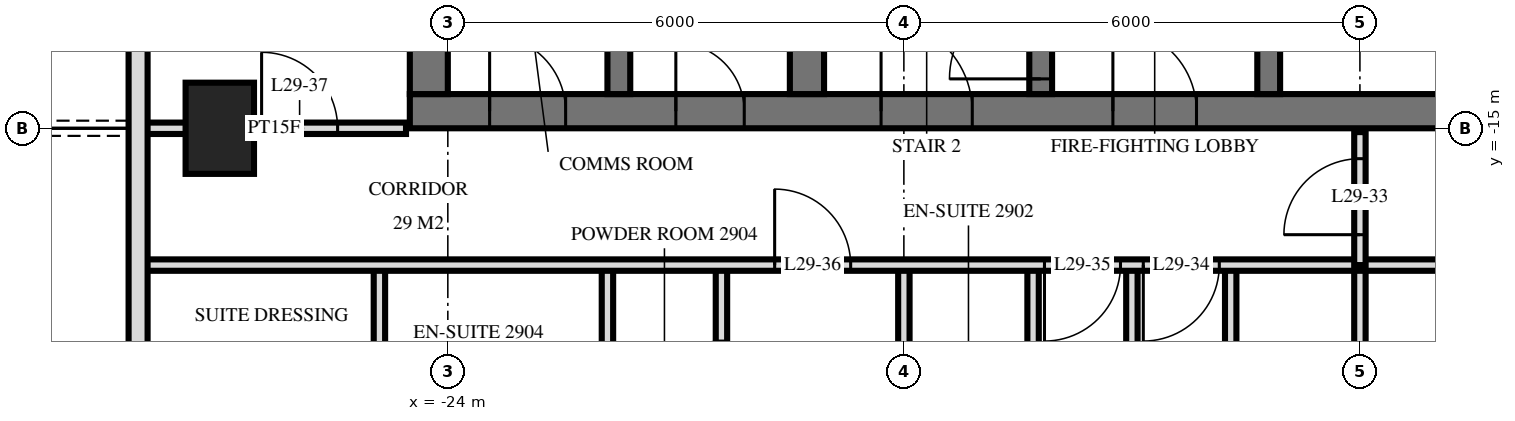
"""IFC4 building model, lengths in metres.
Left out: names, types, materials, properties, quantities, classifications, styles, units other than length and angle.
Written with IfcOpenShell. Run it as: python <this file> out.ifc"""

import sys

from ifc_helpers import new_model, si_unit, direction, frame, frame_2d, origin, origin_2d, place, context, subcontext, project, spatial, rectangle, extrude, element, fill, save


model = new_model("IFC4")
c1 = context("Model", 3, precision=1e-05, world=origin(), true_north=direction((0.0, 1.0)))
c2 = subcontext(c1, "Body", "Model", "MODEL_VIEW")
j1 = project(units=[si_unit("LENGTHUNIT", "METRE"), si_unit("PLANEANGLEUNIT", "RADIAN")], contexts=[c1])
p1 = place(None, origin())
s1 = spatial("IfcSite", under=j1, at=p1, CompositionType="ELEMENT")
p2 = place(p1, origin())
s2 = spatial("IfcBuilding", under=s1, at=p2, CompositionType="ELEMENT")
p3 = place(p2, frame((0.0, 0.0, 116.4)))
s3 = spatial("IfcBuildingStorey", under=s2, at=p3, CompositionType="ELEMENT", Elevation=116.4)
p4 = place(p3, frame((-27.0, -15.0, 0.0), z_axis=(0.0, 0.0, 1.0), x_axis=(0.0, 1.0, 0.0)))
e1 = element("IfcColumn", 1, at=p4, inside=s3, PredefinedType="COLUMN", context=c2, shape_type="SweptSolid", body=[
    extrude(rectangle(XDim=1.2, YDim=0.9, at=origin_2d()), origin(), (0.0, 0.0, 1.0), 3.6),
])
p5 = place(p3, frame((-24.5, -14.775, 0.0), z_axis=(0.0, 0.0, 1.0), x_axis=(1.0, 0.0, 0.0)))
e2 = element("IfcWall", 2, at=p5, inside=s3, PredefinedType="SHEAR", context=c2, shape_type="SweptSolid", body=[
    extrude(rectangle(XDim=14.5, YDim=0.45, at=frame_2d((7.25, 0.0))), origin(), (0.0, 0.0, 1.0), 3.6),
])
p6 = place(p5, frame((6.2, 0.0, 0.0)))
e3 = element("IfcOpeningElement", 3, at=p6, cuts=e2, PredefinedType="OPENING", context=c2, shape_type="SweptSolid", body=[
    extrude(rectangle(XDim=1.2, YDim=2.1, at=frame_2d((0.6, 1.05))), frame((0.0, 0.235, 0.0), z_axis=(0.0, -1.0, 0.0), x_axis=(1.0, 0.0, 0.0)), (0.0, 0.0, 1.0), 0.47),
])
p7 = place(p5, frame((9.25, 0.0, 0.0)))
e4 = element("IfcOpeningElement", 4, at=p7, cuts=e2, PredefinedType="OPENING", context=c2, shape_type="SweptSolid", body=[
    extrude(rectangle(XDim=1.1, YDim=2.1, at=frame_2d((0.55, 1.05))), frame((0.0, 0.235, 0.0), z_axis=(0.0, -1.0, 0.0), x_axis=(1.0, 0.0, 0.0)), (0.0, 0.0, 1.0), 0.47),
])
p8 = place(p5, frame((3.5, 0.0, 0.0)))
e5 = element("IfcOpeningElement", 5, at=p8, cuts=e2, PredefinedType="OPENING", context=c2, shape_type="SweptSolid", body=[
    extrude(rectangle(XDim=0.9, YDim=2.1, at=frame_2d((0.45, 1.05))), frame((0.0, 0.235, 0.0), z_axis=(0.0, -1.0, 0.0), x_axis=(1.0, 0.0, 0.0)), (0.0, 0.0, 1.0), 0.47),
])
p9 = place(p5, frame((1.05, 0.0, 0.0)))
e6 = element("IfcOpeningElement", 6, at=p9, cuts=e2, PredefinedType="OPENING", context=c2, shape_type="SweptSolid", body=[
    extrude(rectangle(XDim=1.0, YDim=2.1, at=frame_2d((0.5, 1.05))), frame((0.0, 0.235, 0.0), z_axis=(0.0, -1.0, 0.0), x_axis=(1.0, 0.0, 0.0)), (0.0, 0.0, 1.0), 0.47),
])
p10 = place(p3, frame((-24.25, -14.55, 0.0), z_axis=(0.0, 0.0, 1.0), x_axis=(0.0, 1.0, 0.0)))
e7 = element("IfcWall", 7, at=p10, inside=s3, PredefinedType="SHEAR", context=c2, shape_type="SweptSolid", body=[
    extrude(rectangle(XDim=14.1, YDim=0.5, at=frame_2d((7.05, 0.0))), origin(), (0.0, 0.0, 1.0), 3.6),
])
p11 = place(p3, frame((-13.2, -14.55, 0.0), z_axis=(0.0, 0.0, 1.0), x_axis=(0.0, 1.0, 0.0)))
e8 = element("IfcWall", 8, at=p11, inside=s3, PredefinedType="SHEAR", context=c2, shape_type="SweptSolid", body=[
    extrude(rectangle(XDim=5.4, YDim=0.3, at=frame_2d((2.7, 0.0))), origin(), (0.0, 0.0, 1.0), 3.6),
])
p12 = place(p11, frame((4.0, 0.0, 0.0)))
e9 = element("IfcOpeningElement", 9, at=p12, cuts=e8, PredefinedType="OPENING", context=c2, shape_type="SweptSolid", body=[
    extrude(rectangle(XDim=1.2, YDim=2.1, at=frame_2d((0.6, 1.05))), frame((0.0, 0.16, 0.0), z_axis=(0.0, -1.0, 0.0), x_axis=(1.0, 0.0, 0.0)), (0.0, 0.0, 1.0), 0.32),
])
p13 = place(p3, frame((-16.2, -14.55, 0.0), z_axis=(0.0, 0.0, 1.0), x_axis=(0.0, 1.0, 0.0)))
e10 = element("IfcWall", 10, at=p13, inside=s3, PredefinedType="SHEAR", context=c2, shape_type="SweptSolid", body=[
    extrude(rectangle(XDim=5.4, YDim=0.3, at=frame_2d((2.7, 0.0))), origin(), (0.0, 0.0, 1.0), 3.6),
])
p14 = place(p13, frame((0.2, 0.0, 0.0)))
e11 = element("IfcOpeningElement", 11, at=p14, cuts=e10, PredefinedType="OPENING", context=c2, shape_type="SweptSolid", body=[
    extrude(rectangle(XDim=1.2, YDim=2.1, at=frame_2d((0.6, 1.05))), frame((0.0, 0.16, 0.0), z_axis=(0.0, -1.0, 0.0), x_axis=(1.0, 0.0, 0.0)), (0.0, 0.0, 1.0), 0.32),
])
p15 = place(p3, frame((-19.275, -14.55, 0.0), z_axis=(0.0, 0.0, 1.0), x_axis=(0.0, 1.0, 0.0)))
e12 = element("IfcWall", 12, at=p15, inside=s3, PredefinedType="SHEAR", context=c2, shape_type="SweptSolid", body=[
    extrude(rectangle(XDim=5.4, YDim=0.45, at=frame_2d((2.7, 0.0))), origin(), (0.0, 0.0, 1.0), 3.6),
])
p16 = place(p3, frame((-21.75, -14.55, 0.0), z_axis=(0.0, 0.0, 1.0), x_axis=(0.0, 1.0, 0.0)))
e13 = element("IfcWall", 13, at=p16, inside=s3, PredefinedType="SHEAR", context=c2, shape_type="SweptSolid", body=[
    extrude(rectangle(XDim=5.4, YDim=0.3, at=frame_2d((2.7, 0.0))), origin(), (0.0, 0.0, 1.0), 3.6),
])
p17 = place(p3, frame((-28.075, -3.325, 0.0), z_axis=(0.0, 0.0, 1.0), x_axis=(0.0, -1.0, 0.0)))
e14 = element("IfcWall", 14, at=p17, inside=s3, PredefinedType="SOLIDWALL", context=c2, shape_type="SweptSolid", body=[
    extrude(rectangle(XDim=25.951, YDim=0.25, at=frame_2d((12.975, 0.0))), origin(), (0.0, 0.0, 1.0), 3.32),
])
p18 = place(p17, frame((7.025, 0.0, 0.0)))
e15 = element("IfcOpeningElement", 15, at=p18, cuts=e14, PredefinedType="OPENING", context=c2, shape_type="SweptSolid", body=[
    extrude(rectangle(XDim=1.8, YDim=2.4, at=frame_2d((0.9, 1.2))), frame((0.0, 0.135, 0.0), z_axis=(0.0, -1.0, 0.0), x_axis=(1.0, 0.0, 0.0)), (0.0, 0.0, 1.0), 0.27),
])
p19 = place(p17, frame((18.175, 0.0, 0.0)))
e16 = element("IfcOpeningElement", 16, at=p19, cuts=e14, PredefinedType="OPENING", context=c2, shape_type="SweptSolid", body=[
    extrude(rectangle(XDim=1.8, YDim=2.4, at=frame_2d((0.9, 1.2))), frame((0.0, 0.135, 0.0), z_axis=(0.0, -1.0, 0.0), x_axis=(1.0, 0.0, 0.0)), (0.0, 0.0, 1.0), 0.27),
])
p20 = place(p17, frame((21.075, 0.0, 0.0)))
e17 = element("IfcOpeningElement", 17, at=p20, cuts=e14, PredefinedType="OPENING", context=c2, shape_type="SweptSolid", body=[
    extrude(rectangle(XDim=1.8, YDim=2.4, at=frame_2d((0.9, 1.2))), frame((0.0, 0.135, 0.0), z_axis=(0.0, -1.0, 0.0), x_axis=(1.0, 0.0, 0.0)), (0.0, 0.0, 1.0), 0.27),
])
p21 = place(p17, frame((23.825, 0.0, 0.3)))
e18 = element("IfcOpeningElement", 18, at=p21, cuts=e14, PredefinedType="OPENING", context=c2, shape_type="SweptSolid", body=[
    extrude(rectangle(XDim=1.8, YDim=2.1, at=frame_2d((0.9, 1.05))), frame((0.0, 0.135, 0.0), z_axis=(0.0, -1.0, 0.0), x_axis=(1.0, 0.0, 0.0)), (0.0, 0.0, 1.0), 0.27),
])
p22 = place(p3, frame((-12.0, -16.8, 0.0), z_axis=(0.0, 0.0, 1.0), x_axis=(0.0, 1.0, 0.0)))
e19 = element("IfcWall", 19, at=p22, inside=s3, PredefinedType="PARTITIONING", context=c2, shape_type="SweptSolid", body=[
    extrude(rectangle(XDim=1.75, YDim=0.15, at=frame_2d((0.875, 0.0))), origin(), (0.0, 0.0, 1.0), 3.32),
])
p23 = place(p22, frame((0.4, 0.0, 0.0)))
e20 = element("IfcOpeningElement", 20, at=p23, cuts=e19, PredefinedType="OPENING", context=c2, shape_type="SweptSolid", body=[
    extrude(rectangle(XDim=1.0, YDim=2.1, at=frame_2d((0.5, 1.05))), frame((0.0, 0.085, 0.0), z_axis=(0.0, -1.0, 0.0), x_axis=(1.0, 0.0, 0.0)), (0.0, 0.0, 1.0), 0.17),
])
p24 = place(p3, frame((-12.0, -33.62, 0.0), z_axis=(0.0, 0.0, 1.0), x_axis=(0.0, 1.0, 0.0)))
e21 = element("IfcWall", 21, at=p24, inside=s3, PredefinedType="PARTITIONING", context=c2, shape_type="SweptSolid", body=[
    extrude(rectangle(XDim=16.82, YDim=0.15, at=frame_2d((8.41, 0.0))), origin(), (0.0, 0.0, 1.0), 3.32),
])
p25 = place(p3, frame((-13.7, -20.6, 0.0), z_axis=(0.0, 0.0, 1.0), x_axis=(0.0, 1.0, 0.0)))
e22 = element("IfcWall", 22, at=p25, inside=s3, PredefinedType="PARTITIONING", context=c2, shape_type="SweptSolid", body=[
    extrude(rectangle(XDim=3.8, YDim=0.15, at=frame_2d((1.9, 0.0))), origin(), (0.0, 0.0, 1.0), 3.32),
])
p26 = place(p25, frame((1.5, 0.0, 0.0)))
e23 = element("IfcOpeningElement", 23, at=p26, cuts=e22, PredefinedType="OPENING", context=c2, shape_type="SweptSolid", body=[
    extrude(rectangle(XDim=0.8, YDim=2.1, at=frame_2d((0.4, 1.05))), frame((0.0, 0.085, 0.0), z_axis=(0.0, -1.0, 0.0), x_axis=(1.0, 0.0, 0.0)), (0.0, 0.0, 1.0), 0.17),
])
p27 = place(p3, frame((-15.0, -33.62, 0.0), z_axis=(0.0, 0.0, 1.0), x_axis=(0.0, 1.0, 0.0)))
e24 = element("IfcWall", 24, at=p27, inside=s3, PredefinedType="PARTITIONING", context=c2, shape_type="SweptSolid", body=[
    extrude(rectangle(XDim=16.82, YDim=0.15, at=frame_2d((8.41, 0.0))), origin(), (0.0, 0.0, 1.0), 3.32),
])
p28 = place(p3, frame((-16.3, -20.6, 0.0), z_axis=(0.0, 0.0, 1.0), x_axis=(0.0, 1.0, 0.0)))
e25 = element("IfcWall", 25, at=p28, inside=s3, PredefinedType="PARTITIONING", context=c2, shape_type="SweptSolid", body=[
    extrude(rectangle(XDim=3.8, YDim=0.15, at=frame_2d((1.9, 0.0))), origin(), (0.0, 0.0, 1.0), 3.32),
])
p29 = place(p28, frame((1.5, 0.0, 0.0)))
e26 = element("IfcOpeningElement", 26, at=p29, cuts=e25, PredefinedType="OPENING", context=c2, shape_type="SweptSolid", body=[
    extrude(rectangle(XDim=0.8, YDim=2.1, at=frame_2d((0.4, 1.05))), frame((0.0, 0.085, 0.0), z_axis=(0.0, -1.0, 0.0), x_axis=(1.0, 0.0, 0.0)), (0.0, 0.0, 1.0), 0.17),
])
p30 = place(p3, frame((-18.0, -19.8, 0.0), z_axis=(0.0, 0.0, 1.0), x_axis=(0.0, 1.0, 0.0)))
e27 = element("IfcWall", 27, at=p30, inside=s3, PredefinedType="PARTITIONING", context=c2, shape_type="SweptSolid", body=[
    extrude(rectangle(XDim=3.0, YDim=0.15, at=frame_2d((1.5, 0.0))), origin(), (0.0, 0.0, 1.0), 3.32),
])
p31 = place(p3, frame((-20.4, -19.8, 0.0), z_axis=(0.0, 0.0, 1.0), x_axis=(0.0, 1.0, 0.0)))
e28 = element("IfcWall", 28, at=p31, inside=s3, PredefinedType="PARTITIONING", context=c2, shape_type="SweptSolid", body=[
    extrude(rectangle(XDim=3.0, YDim=0.15, at=frame_2d((1.5, 0.0))), origin(), (0.0, 0.0, 1.0), 3.32),
])
p32 = place(p31, frame((1.0, 0.0, 0.0)))
e29 = element("IfcOpeningElement", 29, at=p32, cuts=e28, PredefinedType="OPENING", context=c2, shape_type="SweptSolid", body=[
    extrude(rectangle(XDim=1.0, YDim=2.1, at=frame_2d((0.5, 1.05))), frame((0.0, 0.085, 0.0), z_axis=(0.0, -1.0, 0.0), x_axis=(1.0, 0.0, 0.0)), (0.0, 0.0, 1.0), 0.17),
])
p33 = place(p3, frame((-21.9, -19.8, 0.0), z_axis=(0.0, 0.0, 1.0), x_axis=(0.0, 1.0, 0.0)))
e30 = element("IfcWall", 30, at=p33, inside=s3, PredefinedType="PLUMBINGWALL", context=c2, shape_type="SweptSolid", body=[
    extrude(rectangle(XDim=3.0, YDim=0.15, at=frame_2d((1.5, 0.0))), origin(), (0.0, 0.0, 1.0), 3.32),
])
p34 = place(p3, frame((-24.9, -19.8, 0.0), z_axis=(0.0, 0.0, 1.0), x_axis=(0.0, 1.0, 0.0)))
e31 = element("IfcWall", 31, at=p34, inside=s3, PredefinedType="PARTITIONING", context=c2, shape_type="SweptSolid", body=[
    extrude(rectangle(XDim=3.0, YDim=0.15, at=frame_2d((1.5, 0.0))), origin(), (0.0, 0.0, 1.0), 3.32),
])
p35 = place(p3, frame((-28.02, -16.8, 0.0), z_axis=(0.0, 0.0, 1.0), x_axis=(1.0, 0.0, 0.0)))
e32 = element("IfcWall", 32, at=p35, inside=s3, PredefinedType="PARTITIONING", context=c2, shape_type="SweptSolid", body=[
    extrude(rectangle(XDim=56.04, YDim=0.15, at=frame_2d((28.02, 0.0))), origin(), (0.0, 0.0, 1.0), 3.32),
])
p36 = place(p35, frame((13.17, 0.0, 0.0)))
e33 = element("IfcOpeningElement", 33, at=p36, cuts=e32, PredefinedType="OPENING", context=c2, shape_type="SweptSolid", body=[
    extrude(rectangle(XDim=1.0, YDim=2.1, at=frame_2d((0.5, 1.05))), frame((0.0, 0.085, 0.0), z_axis=(0.0, -1.0, 0.0), x_axis=(1.0, 0.0, 0.0)), (0.0, 0.0, 1.0), 0.17),
])
p37 = place(p35, frame((11.87, 0.0, 0.0)))
e34 = element("IfcOpeningElement", 34, at=p37, cuts=e32, PredefinedType="OPENING", context=c2, shape_type="SweptSolid", body=[
    extrude(rectangle(XDim=1.0, YDim=2.1, at=frame_2d((0.5, 1.05))), frame((0.0, 0.085, 0.0), z_axis=(0.0, -1.0, 0.0), x_axis=(1.0, 0.0, 0.0)), (0.0, 0.0, 1.0), 0.17),
])
p38 = place(p35, frame((8.32, 0.0, 0.0)))
e35 = element("IfcOpeningElement", 35, at=p38, cuts=e32, PredefinedType="OPENING", context=c2, shape_type="SweptSolid", body=[
    extrude(rectangle(XDim=1.0, YDim=2.1, at=frame_2d((0.5, 1.05))), frame((0.0, 0.085, 0.0), z_axis=(0.0, -1.0, 0.0), x_axis=(1.0, 0.0, 0.0)), (0.0, 0.0, 1.0), 0.17),
])
p39 = place(p35, frame((40.42, 0.0, 0.0)))
e36 = element("IfcOpeningElement", 36, at=p39, cuts=e32, PredefinedType="OPENING", context=c2, shape_type="SweptSolid", body=[
    extrude(rectangle(XDim=1.0, YDim=2.1, at=frame_2d((0.5, 1.05))), frame((0.0, 0.085, 0.0), z_axis=(0.0, -1.0, 0.0), x_axis=(1.0, 0.0, 0.0)), (0.0, 0.0, 1.0), 0.17),
])
p40 = place(p35, frame((46.72, 0.0, 0.0)))
e37 = element("IfcOpeningElement", 37, at=p40, cuts=e32, PredefinedType="OPENING", context=c2, shape_type="SweptSolid", body=[
    extrude(rectangle(XDim=1.0, YDim=2.1, at=frame_2d((0.5, 1.05))), frame((0.0, 0.085, 0.0), z_axis=(0.0, -1.0, 0.0), x_axis=(1.0, 0.0, 0.0)), (0.0, 0.0, 1.0), 0.17),
])
p41 = place(p35, frame((21.52, 0.0, 0.0)))
e38 = element("IfcOpeningElement", 38, at=p41, cuts=e32, PredefinedType="OPENING", context=c2, shape_type="SweptSolid", body=[
    extrude(rectangle(XDim=1.0, YDim=2.1, at=frame_2d((0.5, 1.05))), frame((0.0, 0.085, 0.0), z_axis=(0.0, -1.0, 0.0), x_axis=(1.0, 0.0, 0.0)), (0.0, 0.0, 1.0), 0.17),
])
p42 = place(p35, frame((30.52, 0.0, 0.0)))
e39 = element("IfcOpeningElement", 39, at=p42, cuts=e32, PredefinedType="OPENING", context=c2, shape_type="SweptSolid", body=[
    extrude(rectangle(XDim=1.0, YDim=2.1, at=frame_2d((0.5, 1.05))), frame((0.0, 0.085, 0.0), z_axis=(0.0, -1.0, 0.0), x_axis=(1.0, 0.0, 0.0)), (0.0, 0.0, 1.0), 0.17),
])
p43 = place(p35, frame((36.52, 0.0, 0.0)))
e40 = element("IfcOpeningElement", 40, at=p43, cuts=e32, PredefinedType="OPENING", context=c2, shape_type="SweptSolid", body=[
    extrude(rectangle(XDim=1.0, YDim=2.1, at=frame_2d((0.5, 1.05))), frame((0.0, 0.085, 0.0), z_axis=(0.0, -1.0, 0.0), x_axis=(1.0, 0.0, 0.0)), (0.0, 0.0, 1.0), 0.17),
])
p44 = place(p3, frame((-28.02, -15.0, 0.0), z_axis=(0.0, 0.0, 1.0), x_axis=(1.0, 0.0, 0.0)))
e41 = element("IfcWall", 41, at=p44, inside=s3, PredefinedType="PARTITIONING", context=c2, shape_type="SweptSolid", body=[
    extrude(rectangle(XDim=3.47, YDim=0.15, at=frame_2d((1.735, 0.0))), origin(), (0.0, 0.0, 1.0), 3.32),
])
p45 = place(p44, frame((1.57, 0.0, 0.0)))
e42 = element("IfcOpeningElement", 42, at=p45, cuts=e41, PredefinedType="OPENING", context=c2, shape_type="SweptSolid", body=[
    extrude(rectangle(XDim=1.0, YDim=2.1, at=frame_2d((0.5, 1.05))), frame((0.0, 0.085, 0.0), z_axis=(0.0, -1.0, 0.0), x_axis=(1.0, 0.0, 0.0)), (0.0, 0.0, 1.0), 0.17),
])
p46 = place(p6, origin())
e43 = element("IfcDoor", 43, at=p46, inside=s3, OperationType="SINGLE_SWING_RIGHT", PredefinedType="DOOR", context=c2, shape_type="SweptSolid", body=[
    extrude(rectangle(XDim=1.2, YDim=2.1, at=frame_2d((0.6, 1.05))), frame((0.0, 0.025, 0.0), z_axis=(0.0, -1.0, 0.0), x_axis=(1.0, 0.0, 0.0)), (0.0, 0.0, 1.0), 0.05),
])
fill(e3, e43)
p47 = place(p7, origin())
e44 = element("IfcDoor", 44, at=p47, inside=s3, OperationType="SINGLE_SWING_RIGHT", PredefinedType="DOOR", context=c2, shape_type="SweptSolid", body=[
    extrude(rectangle(XDim=1.1, YDim=2.1, at=frame_2d((0.55, 1.05))), frame((0.0, 0.025, 0.0), z_axis=(0.0, -1.0, 0.0), x_axis=(1.0, 0.0, 0.0)), (0.0, 0.0, 1.0), 0.05),
])
fill(e4, e44)
p48 = place(p8, origin())
e45 = element("IfcDoor", 45, at=p48, inside=s3, OperationType="SINGLE_SWING_RIGHT", PredefinedType="DOOR", context=c2, shape_type="SweptSolid", body=[
    extrude(rectangle(XDim=0.9, YDim=2.1, at=frame_2d((0.45, 1.05))), frame((0.0, 0.025, 0.0), z_axis=(0.0, -1.0, 0.0), x_axis=(1.0, 0.0, 0.0)), (0.0, 0.0, 1.0), 0.05),
])
fill(e5, e45)
p49 = place(p9, origin())
e46 = element("IfcDoor", 46, at=p49, inside=s3, OperationType="SINGLE_SWING_RIGHT", PredefinedType="DOOR", context=c2, shape_type="SweptSolid", body=[
    extrude(rectangle(XDim=1.0, YDim=2.1, at=frame_2d((0.5, 1.05))), frame((0.0, 0.025, 0.0), z_axis=(0.0, -1.0, 0.0), x_axis=(1.0, 0.0, 0.0)), (0.0, 0.0, 1.0), 0.05),
])
fill(e6, e46)
p50 = place(p14, origin())
e47 = element("IfcDoor", 47, at=p50, inside=s3, OperationType="SINGLE_SWING_RIGHT", PredefinedType="DOOR", context=c2, shape_type="SweptSolid", body=[
    extrude(rectangle(XDim=1.2, YDim=2.1, at=frame_2d((0.6, 1.05))), frame((0.0, 0.025, 0.0), z_axis=(0.0, -1.0, 0.0), x_axis=(1.0, 0.0, 0.0)), (0.0, 0.0, 1.0), 0.05),
])
fill(e11, e47)
p51 = place(p23, origin())
e48 = element("IfcDoor", 48, at=p51, inside=s3, OperationType="SINGLE_SWING_RIGHT", PredefinedType="DOOR", context=c2, shape_type="SweptSolid", body=[
    extrude(rectangle(XDim=1.0, YDim=2.1, at=frame_2d((0.5, 1.05))), frame((0.0, 0.025, 0.0), z_axis=(0.0, -1.0, 0.0), x_axis=(1.0, 0.0, 0.0)), (0.0, 0.0, 1.0), 0.05),
])
fill(e20, e48)
p52 = place(p36, frame((0.5, 0.0, 0.0), z_axis=(0.0, 0.0, 1.0), x_axis=(-1.0, 0.0, 0.0)))
e49 = element("IfcDoor", 49, at=p52, inside=s3, OperationType="SINGLE_SWING_LEFT", PredefinedType="DOOR", context=c2, shape_type="SweptSolid", body=[
    extrude(rectangle(XDim=1.0, YDim=2.1, at=frame_2d((0.0, 1.05))), frame((0.0, -0.025, 0.0), z_axis=(0.0, 1.0, 0.0), x_axis=(-1.0, 0.0, 0.0)), (0.0, 0.0, 1.0), 0.05),
])
fill(e33, e49)
p53 = place(p37, frame((0.5, 0.0, 0.0), z_axis=(0.0, 0.0, 1.0), x_axis=(-1.0, 0.0, 0.0)))
e50 = element("IfcDoor", 50, at=p53, inside=s3, OperationType="SINGLE_SWING_LEFT", PredefinedType="DOOR", context=c2, shape_type="SweptSolid", body=[
    extrude(rectangle(XDim=1.0, YDim=2.1, at=frame_2d((0.0, 1.05))), frame((0.0, -0.025, 0.0), z_axis=(0.0, 1.0, 0.0), x_axis=(-1.0, 0.0, 0.0)), (0.0, 0.0, 1.0), 0.05),
])
fill(e34, e50)
p54 = place(p38, origin())
e51 = element("IfcDoor", 51, at=p54, inside=s3, OperationType="SINGLE_SWING_RIGHT", PredefinedType="DOOR", context=c2, shape_type="SweptSolid", body=[
    extrude(rectangle(XDim=1.0, YDim=2.1, at=frame_2d((0.5, 1.05))), frame((0.0, 0.025, 0.0), z_axis=(0.0, -1.0, 0.0), x_axis=(1.0, 0.0, 0.0)), (0.0, 0.0, 1.0), 0.05),
])
fill(e35, e51)
p55 = place(p45, origin())
e52 = element("IfcDoor", 52, at=p55, inside=s3, OperationType="SINGLE_SWING_RIGHT", PredefinedType="DOOR", context=c2, shape_type="SweptSolid", body=[
    extrude(rectangle(XDim=1.0, YDim=2.1, at=frame_2d((0.5, 1.05))), frame((0.0, 0.025, 0.0), z_axis=(0.0, -1.0, 0.0), x_axis=(1.0, 0.0, 0.0)), (0.0, 0.0, 1.0), 0.05),
])
fill(e42, e52)
save(model, sys.argv[1])
